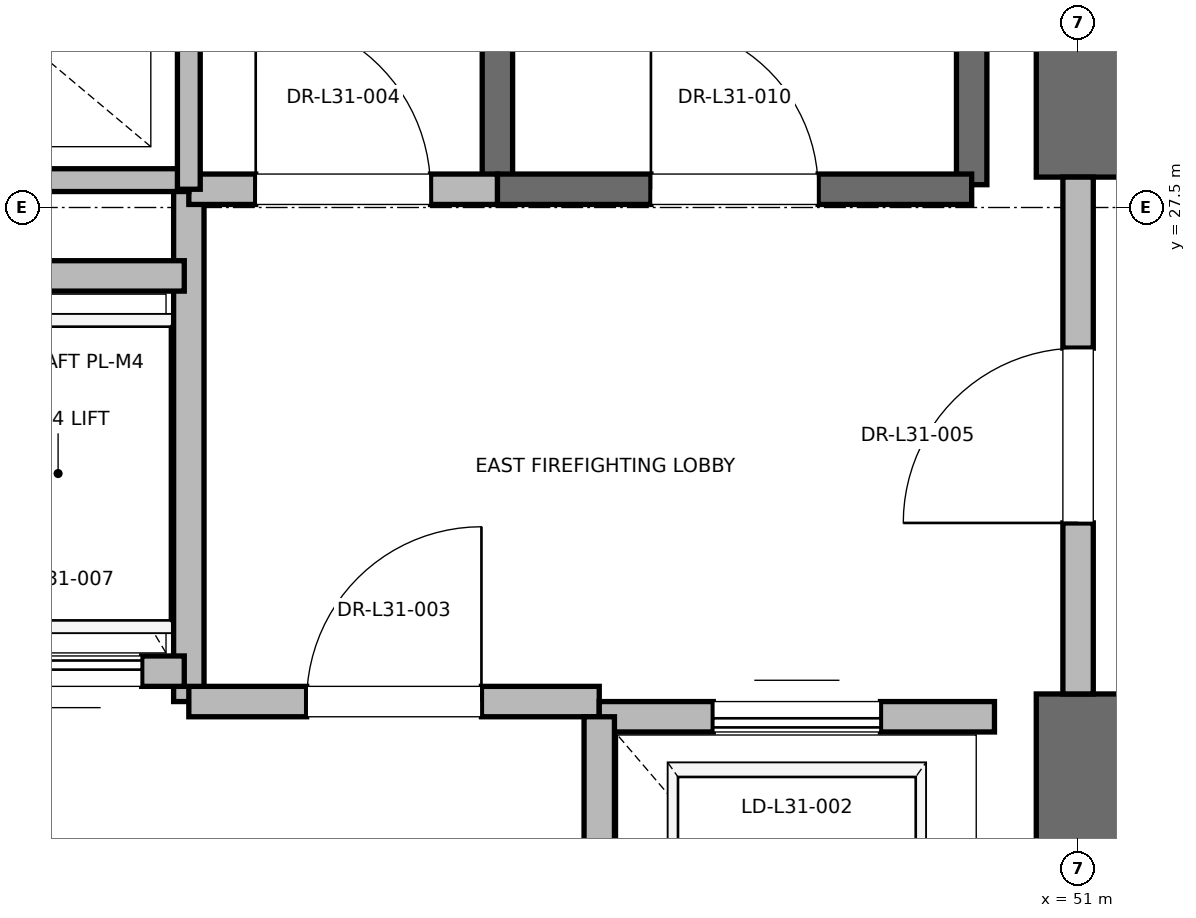
"""IFC4 building model, lengths in metres.
Left out: names, types, materials, properties, quantities, classifications, styles, units other than length and angle.
Written with IfcOpenShell. Run it as: python <this file> out.ifc"""

import sys

from ifc_helpers import new_model, si_unit, direction, frame, frame_2d, origin, place, context, subcontext, project, spatial, rectangle, extrude, element, fill, save


model = new_model("IFC4")
c1 = context("Model", 3, precision=1e-05, world=origin(), true_north=direction((0.0, 1.0)))
c2 = subcontext(c1, "Body", "Model", "MODEL_VIEW")
j1 = project(units=[si_unit("LENGTHUNIT", "METRE"), si_unit("PLANEANGLEUNIT", "RADIAN")], contexts=[c1])
p1 = place(None, origin())
s1 = spatial("IfcSite", under=j1, at=p1, CompositionType="ELEMENT")
p2 = place(p1, origin())
s2 = spatial("IfcBuilding", under=s1, at=p2, CompositionType="ELEMENT")
p3 = place(p2, frame((0.0, 0.0, 136.4)))
s3 = spatial("IfcBuildingStorey", under=s2, at=p3, CompositionType="ELEMENT", Elevation=136.4)
p4 = place(p3, frame((51.0, 18.5, 0.0), z_axis=(0.0, 0.0, 1.0), x_axis=(0.0, 1.0, 0.0)))
e1 = element("IfcWall", 1, at=p4, inside=s3, PredefinedType="SHEAR", context=c2, shape_type="SweptSolid", body=[
    extrude(rectangle(XDim=5.8, YDim=0.55, at=frame_2d((2.9, 0.0))), origin(), (0.0, 0.0, 1.0), 3.775),
])
p5 = place(p3, frame((51.0, 27.7, 0.0), z_axis=(0.0, 0.0, 1.0), x_axis=(0.0, 1.0, 0.0)))
e2 = element("IfcWall", 2, at=p5, inside=s3, PredefinedType="SHEAR", context=c2, shape_type="SweptSolid", body=[
    extrude(rectangle(XDim=8.8, YDim=0.55, at=frame_2d((4.4, 0.0))), origin(), (0.0, 0.0, 1.0), 3.775),
])
p6 = place(p3, frame((50.3, 27.65, 0.0), z_axis=(0.0, 0.0, 1.0), x_axis=(0.0, 1.0, 0.0)))
e3 = element("IfcWall", 3, at=p6, inside=s3, PredefinedType="SOLIDWALL", context=c2, shape_type="SweptSolid", body=[
    extrude(rectangle(XDim=8.15, YDim=0.2, at=frame_2d((4.075, 0.0))), origin(), (0.0, 0.0, 1.0), 3.775),
])
p7 = place(p3, frame((47.18, 27.62, 0.0), z_axis=(0.0, 0.0, 1.0), x_axis=(0.0, 1.0, 0.0)))
e4 = element("IfcWall", 4, at=p7, inside=s3, PredefinedType="SOLIDWALL", context=c2, shape_type="SweptSolid", body=[
    extrude(rectangle(XDim=8.18, YDim=0.2, at=frame_2d((4.09, 0.0))), origin(), (0.0, 0.0, 1.0), 3.775),
])
p8 = place(p3, frame((47.18, 27.62, 0.0), z_axis=(0.0, 0.0, 1.0), x_axis=(1.0, 0.0, 0.0)))
e5 = element("IfcWall", 5, at=p8, inside=s3, PredefinedType="SOLIDWALL", context=c2, shape_type="SweptSolid", body=[
    extrude(rectangle(XDim=3.12, YDim=0.2, at=frame_2d((1.56, 0.0))), origin(), (0.0, 0.0, 1.0), 3.775),
])
p9 = place(p8, frame((1.01, 0.0, 0.0)))
e6 = element("IfcOpeningElement", 6, at=p9, cuts=e5, PredefinedType="OPENING", context=c2, shape_type="SweptSolid", body=[
    extrude(rectangle(XDim=1.1, YDim=2.15, at=frame_2d((0.55, 1.075))), frame((0.0, 0.1, 0.0), z_axis=(0.0, -1.0, 0.0), x_axis=(1.0, 0.0, 0.0)), (0.0, 0.0, 1.0), 0.2),
])
p10 = place(p3, frame((45.15, 24.25, 0.0), z_axis=(0.0, 0.0, 1.0), x_axis=(0.0, 1.0, 0.0)))
e7 = element("IfcWall", 7, at=p10, inside=s3, PredefinedType="PARTITIONING", context=c2, shape_type="SweptSolid", body=[
    extrude(rectangle(XDim=3.37, YDim=0.2, at=frame_2d((1.685, 0.0))), origin(), (0.0, 0.0, 1.0), 3.775),
])
p11 = place(p3, frame((45.15, 24.25, 0.0), z_axis=(0.0, 0.0, 1.0), x_axis=(1.0, 0.0, 0.0)))
e8 = element("IfcWall", 8, at=p11, inside=s3, PredefinedType="PARTITIONING", context=c2, shape_type="SweptSolid", body=[
    extrude(rectangle(XDim=2.7, YDim=0.2, at=frame_2d((1.35, 0.0))), origin(), (0.0, 0.0, 1.0), 3.775),
])
p12 = place(p11, frame((0.775, 0.0, 0.0)))
e9 = element("IfcOpeningElement", 9, at=p12, cuts=e8, PredefinedType="OPENING", context=c2, shape_type="SweptSolid", body=[
    extrude(rectangle(XDim=1.15, YDim=2.2, at=frame_2d((0.575, 1.1))), frame((0.0, 0.1, 0.0), z_axis=(0.0, -1.0, 0.0), x_axis=(1.0, 0.0, 0.0)), (0.0, 0.0, 1.0), 0.2),
])
p13 = place(p3, frame((45.15, 27.62, 0.0), z_axis=(0.0, 0.0, 1.0), x_axis=(1.0, 0.0, 0.0)))
e10 = element("IfcWall", 10, at=p13, inside=s3, PredefinedType="PARTITIONING", context=c2, shape_type="SweptSolid", body=[
    extrude(rectangle(XDim=2.03, YDim=0.2, at=frame_2d((1.015, 0.0))), origin(), (0.0, 0.0, 1.0), 3.775),
])
p14 = place(p13, frame((0.44, 0.0, 0.0)))
e11 = element("IfcOpeningElement", 11, at=p14, cuts=e10, PredefinedType="OPENING", context=c2, shape_type="SweptSolid", body=[
    extrude(rectangle(XDim=1.15, YDim=2.2, at=frame_2d((0.575, 1.1))), frame((0.0, 0.1, 0.0), z_axis=(0.0, -1.0, 0.0), x_axis=(1.0, 0.0, 0.0)), (0.0, 0.0, 1.0), 0.2),
])
p15 = place(p3, frame((51.0, 24.3, 0.0), z_axis=(0.0, 0.0, 1.0), x_axis=(0.0, 1.0, 0.0)))
e12 = element("IfcWall", 12, at=p15, inside=s3, PredefinedType="PARTITIONING", context=c2, shape_type="SweptSolid", body=[
    extrude(rectangle(XDim=3.4, YDim=0.2, at=frame_2d((1.7, 0.0))), origin(), (0.0, 0.0, 1.0), 2.755),
])
p16 = place(p15, frame((1.125, 0.0, 0.0)))
e13 = element("IfcOpeningElement", 13, at=p16, cuts=e12, PredefinedType="OPENING", context=c2, shape_type="SweptSolid", body=[
    extrude(rectangle(XDim=1.15, YDim=2.2, at=frame_2d((0.575, 1.1))), frame((0.0, 0.1, 0.0), z_axis=(0.0, -1.0, 0.0), x_axis=(1.0, 0.0, 0.0)), (0.0, 0.0, 1.0), 0.2),
])
p17 = place(p3, frame((50.45, 24.15, 0.0), z_axis=(0.0, 0.0, 1.0), x_axis=(-1.0, 0.0, 0.0)))
e14 = element("IfcWall", 14, at=p17, inside=s3, PredefinedType="SOLIDWALL", context=c2, shape_type="SweptSolid", body=[
    extrude(rectangle(XDim=2.6, YDim=0.2, at=frame_2d((1.3, 0.0))), origin(), (0.0, 0.0, 1.0), 2.755),
])
p18 = place(p17, frame((0.75, 0.0, 0.0)))
e15 = element("IfcOpeningElement", 15, at=p18, cuts=e14, PredefinedType="OPENING", context=c2, shape_type="SweptSolid", body=[
    extrude(rectangle(XDim=1.1, YDim=2.2, at=frame_2d((0.55, 1.1))), frame((0.0, 0.1, 0.0), z_axis=(0.0, -1.0, 0.0), x_axis=(1.0, 0.0, 0.0)), (0.0, 0.0, 1.0), 0.2),
])
p19 = place(p3, frame((47.85, 24.15, 0.0), z_axis=(0.0, 0.0, 1.0), x_axis=(0.0, -1.0, 0.0)))
e16 = element("IfcWall", 16, at=p19, inside=s3, PredefinedType="SOLIDWALL", context=c2, shape_type="SweptSolid", body=[
    extrude(rectangle(XDim=3.0, YDim=0.2, at=frame_2d((1.5, 0.0))), origin(), (0.0, 0.0, 1.0), 3.775),
])
p20 = place(p3, frame((43.46, 24.45, 0.0), z_axis=(0.0, 0.0, 1.0), x_axis=(1.0, 0.0, 0.0)))
e17 = element("IfcWall", 17, at=p20, inside=s3, PredefinedType="SOLIDWALL", context=c2, shape_type="SweptSolid", body=[
    extrude(rectangle(XDim=1.66, YDim=0.2, at=frame_2d((0.83, 0.0))), origin(), (0.0, 0.0, 1.0), 3.775),
])
p21 = place(p20, frame((0.28, 0.0, 0.0)))
e18 = element("IfcOpeningElement", 18, at=p21, cuts=e17, PredefinedType="OPENING", context=c2, shape_type="SweptSolid", body=[
    extrude(rectangle(XDim=1.1, YDim=2.2, at=frame_2d((0.55, 1.1))), frame((0.0, 0.1, 0.0), z_axis=(0.0, -1.0, 0.0), x_axis=(1.0, 0.0, 0.0)), (0.0, 0.0, 1.0), 0.2),
])
p22 = place(p3, frame((45.12, 27.05, 0.0), z_axis=(0.0, 0.0, 1.0), x_axis=(-1.0, 0.0, 0.0)))
e19 = element("IfcWall", 19, at=p22, inside=s3, PredefinedType="SOLIDWALL", context=c2, shape_type="SweptSolid", body=[
    extrude(rectangle(XDim=1.66, YDim=0.2, at=frame_2d((0.83, 0.0))), origin(), (0.0, 0.0, 1.0), 3.775),
])
p23 = place(p3, frame((41.56, 27.68, 0.0), z_axis=(0.0, 0.0, 1.0), x_axis=(1.0, 0.0, 0.0)))
e20 = element("IfcWall", 20, at=p23, inside=s3, PredefinedType="PARTITIONING", context=c2, shape_type="SweptSolid", body=[
    extrude(rectangle(XDim=3.59, YDim=0.15, at=frame_2d((1.795, 0.0))), origin(), (0.0, 0.0, 1.0), 2.85),
])
p24 = place(p3, frame((45.15, 27.62, 0.0), z_axis=(0.0, 0.0, 1.0), x_axis=(0.0, 1.0, 0.0)))
e21 = element("IfcWall", 21, at=p24, inside=s3, PredefinedType="PARTITIONING", context=c2, shape_type="SweptSolid", body=[
    extrude(rectangle(XDim=3.1, YDim=0.15, at=frame_2d((1.55, 0.0))), origin(), (0.0, 0.0, 1.0), 2.85),
])
p25 = place(p9, origin())
e22 = element("IfcDoor", 22, at=p25, inside=s3, OperationType="SINGLE_SWING_LEFT", PredefinedType="DOOR", context=c2, shape_type="SweptSolid", body=[
    extrude(rectangle(XDim=1.1, YDim=2.15, at=frame_2d((0.55, 1.075))), frame((0.0, 0.025, 0.0), z_axis=(0.0, -1.0, 0.0), x_axis=(1.0, 0.0, 0.0)), (0.0, 0.0, 1.0), 0.05),
])
fill(e6, e22)
p26 = place(p12, origin())
e23 = element("IfcDoor", 23, at=p26, inside=s3, OperationType="SINGLE_SWING_RIGHT", PredefinedType="DOOR", context=c2, shape_type="SweptSolid", body=[
    extrude(rectangle(XDim=1.15, YDim=2.2, at=frame_2d((0.575, 1.1))), frame((0.0, 0.025, 0.0), z_axis=(0.0, -1.0, 0.0), x_axis=(1.0, 0.0, 0.0)), (0.0, 0.0, 1.0), 0.05),
])
fill(e9, e23)
p27 = place(p14, origin())
e24 = element("IfcDoor", 24, at=p27, inside=s3, OperationType="SINGLE_SWING_LEFT", PredefinedType="DOOR", context=c2, shape_type="SweptSolid", body=[
    extrude(rectangle(XDim=1.15, YDim=2.2, at=frame_2d((0.575, 1.1))), frame((0.0, 0.025, 0.0), z_axis=(0.0, -1.0, 0.0), x_axis=(1.0, 0.0, 0.0)), (0.0, 0.0, 1.0), 0.05),
])
fill(e11, e24)
p28 = place(p16, origin())
e25 = element("IfcDoor", 25, at=p28, inside=s3, OperationType="SINGLE_SWING_LEFT", PredefinedType="DOOR", context=c2, shape_type="SweptSolid", body=[
    extrude(rectangle(XDim=1.15, YDim=2.2, at=frame_2d((0.575, 1.1))), frame((0.0, 0.025, 0.0), z_axis=(0.0, -1.0, 0.0), x_axis=(1.0, 0.0, 0.0)), (0.0, 0.0, 1.0), 0.05),
])
fill(e13, e25)
p29 = place(p18, origin())
e26 = element("IfcDoor", 26, at=p29, inside=s3, OperationType="SLIDING_TO_RIGHT", PredefinedType="DOOR", context=c2, shape_type="SweptSolid", body=[
    extrude(rectangle(XDim=1.1, YDim=2.2, at=frame_2d((0.55, 1.1))), frame((0.0, 0.025, 0.0), z_axis=(0.0, -1.0, 0.0), x_axis=(1.0, 0.0, 0.0)), (0.0, 0.0, 1.0), 0.05),
])
fill(e15, e26)
p30 = place(p21, origin())
e27 = element("IfcDoor", 27, at=p30, inside=s3, OperationType="SLIDING_TO_RIGHT", PredefinedType="DOOR", context=c2, shape_type="SweptSolid", body=[
    extrude(rectangle(XDim=1.1, YDim=2.2, at=frame_2d((0.55, 1.1))), frame((0.0, 0.025, 0.0), z_axis=(0.0, -1.0, 0.0), x_axis=(1.0, 0.0, 0.0)), (0.0, 0.0, 1.0), 0.05),
])
fill(e18, e27)
save(model, sys.argv[1])
